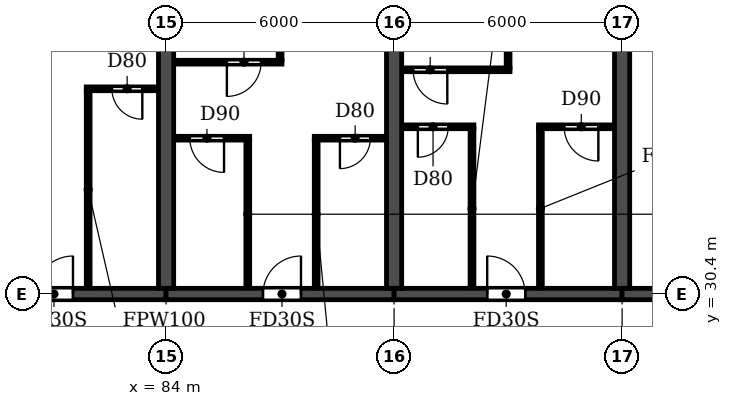
"""IFC4 building model, lengths in metres.
Left out: names, types, materials, properties, quantities, classifications, styles, units other than length and angle.
Written with IfcOpenShell. Run it as: python <this file> out.ifc"""

import sys

from ifc_helpers import new_model, si_unit, direction, frame, frame_2d, origin, place, context, subcontext, project, spatial, rectangle, extrude, element, fill, save


model = new_model("IFC4")
c1 = context("Model", 3, precision=1e-05, world=origin(), true_north=direction((0.0, 1.0)))
c2 = subcontext(c1, "Body", "Model", "MODEL_VIEW")
j1 = project(units=[si_unit("LENGTHUNIT", "METRE"), si_unit("PLANEANGLEUNIT", "RADIAN")], contexts=[c1])
p1 = place(None, origin())
s1 = spatial("IfcSite", under=j1, at=p1, CompositionType="ELEMENT")
p2 = place(p1, origin())
s2 = spatial("IfcBuilding", under=s1, at=p2, CompositionType="ELEMENT")
p3 = place(p2, frame((0.0, 0.0, 33.3)))
s3 = spatial("IfcBuildingStorey", under=s2, at=p3, CompositionType="ELEMENT", Elevation=33.3)
for number, where, z_axis, x_axis in (
    (1, (84.0, 30.55, 0.0), (0.0, 0.0, 1.0), (0.0, 1.0, 0.0)),
    (2, (90.0, 30.55, 0.0), (0.0, 0.0, 1.0), (0.0, 1.0, 0.0)),
    (3, (96.0, 30.55, 0.0), (0.0, 0.0, 1.0), (0.0, 1.0, 0.0)),
):
    element("IfcWall", number, at=place(p3, frame(where, z_axis=z_axis, x_axis=x_axis)), inside=s3, PredefinedType="SHEAR", context=c2, shape_type="SweptSolid", body=[
        extrude(rectangle(XDim=14.05, YDim=0.4, at=frame_2d((7.025, 0.0))), origin(), (0.0, 0.0, 1.0), 3.05),
    ])
p4 = place(p3, frame((78.0, 30.4, 0.0), z_axis=(0.0, 0.0, 1.0), x_axis=(1.0, 0.0, 0.0)))
e4 = element("IfcWall", 4, at=p4, inside=s3, PredefinedType="SHEAR", context=c2, shape_type="SweptSolid", body=[
    extrude(rectangle(XDim=6.0, YDim=0.3, at=frame_2d((3.0, 0.0))), origin(), (0.0, 0.0, 1.0), 2.45),
])
p5 = place(p4, frame((2.55, 0.0, 0.0)))
e5 = element("IfcOpeningElement", 5, at=p5, cuts=e4, PredefinedType="OPENING", context=c2, shape_type="SweptSolid", body=[
    extrude(rectangle(XDim=1.0, YDim=2.1, at=frame_2d((0.5, 1.05))), frame((0.0, 0.16, 0.0), z_axis=(0.0, -1.0, 0.0), x_axis=(1.0, 0.0, 0.0)), (0.0, 0.0, 1.0), 0.32),
])
p6 = place(p3, frame((84.0, 30.4, 0.0), z_axis=(0.0, 0.0, 1.0), x_axis=(1.0, 0.0, 0.0)))
e6 = element("IfcWall", 6, at=p6, inside=s3, PredefinedType="SHEAR", context=c2, shape_type="SweptSolid", body=[
    extrude(rectangle(XDim=6.0, YDim=0.3, at=frame_2d((3.0, 0.0))), origin(), (0.0, 0.0, 1.0), 2.45),
])
p7 = place(p6, frame((2.55, 0.0, 0.0)))
e7 = element("IfcOpeningElement", 7, at=p7, cuts=e6, PredefinedType="OPENING", context=c2, shape_type="SweptSolid", body=[
    extrude(rectangle(XDim=1.0, YDim=2.1, at=frame_2d((0.5, 1.05))), frame((0.0, 0.16, 0.0), z_axis=(0.0, -1.0, 0.0), x_axis=(1.0, 0.0, 0.0)), (0.0, 0.0, 1.0), 0.32),
])
p8 = place(p3, frame((90.0, 30.4, 0.0), z_axis=(0.0, 0.0, 1.0), x_axis=(1.0, 0.0, 0.0)))
e8 = element("IfcWall", 8, at=p8, inside=s3, PredefinedType="SHEAR", context=c2, shape_type="SweptSolid", body=[
    extrude(rectangle(XDim=6.0, YDim=0.3, at=frame_2d((3.0, 0.0))), origin(), (0.0, 0.0, 1.0), 2.45),
])
p9 = place(p8, frame((2.45, 0.0, 0.0)))
e9 = element("IfcOpeningElement", 9, at=p9, cuts=e8, PredefinedType="OPENING", context=c2, shape_type="SweptSolid", body=[
    extrude(rectangle(XDim=1.0, YDim=2.1, at=frame_2d((0.5, 1.05))), frame((0.0, 0.16, 0.0), z_axis=(0.0, -1.0, 0.0), x_axis=(1.0, 0.0, 0.0)), (0.0, 0.0, 1.0), 0.32),
])
p10 = place(p3, frame((96.0, 30.4, 0.0), z_axis=(0.0, 0.0, 1.0), x_axis=(1.0, 0.0, 0.0)))
e10 = element("IfcWall", 10, at=p10, inside=s3, PredefinedType="SHEAR", context=c2, shape_type="SweptSolid", body=[
    extrude(rectangle(XDim=5.8, YDim=0.3, at=frame_2d((2.9, 0.0))), origin(), (0.0, 0.0, 1.0), 2.45),
])
p11 = place(p10, frame((2.5, 0.0, 0.0)))
e11 = element("IfcOpeningElement", 11, at=p11, cuts=e10, PredefinedType="OPENING", context=c2, shape_type="SweptSolid", body=[
    extrude(rectangle(XDim=1.0, YDim=2.1, at=frame_2d((0.5, 1.05))), frame((0.0, 0.16, 0.0), z_axis=(0.0, -1.0, 0.0), x_axis=(1.0, 0.0, 0.0)), (0.0, 0.0, 1.0), 0.32),
])
p12 = place(p3, frame((84.21, 34.5, 0.0), z_axis=(0.0, 0.0, 1.0), x_axis=(1.0, 0.0, 0.0)))
e12 = element("IfcWall", 12, at=p12, inside=s3, PredefinedType="PARTITIONING", context=c2, shape_type="SweptSolid", body=[
    extrude(rectangle(XDim=1.99, YDim=0.1, at=frame_2d((0.995, 0.0))), origin(), (0.0, 0.0, 1.0), 3.05),
])
p13 = place(p12, frame((0.415, 0.0, 0.0)))
e13 = element("IfcOpeningElement", 13, at=p13, cuts=e12, PredefinedType="OPENING", context=c2, shape_type="SweptSolid", body=[
    extrude(rectangle(XDim=0.9, YDim=2.1, at=frame_2d((0.45, 1.05))), frame((0.0, 0.06, 0.0), z_axis=(0.0, -1.0, 0.0), x_axis=(1.0, 0.0, 0.0)), (0.0, 0.0, 1.0), 0.12),
])
p14 = place(p3, frame((87.9, 34.5, 0.0), z_axis=(0.0, 0.0, 1.0), x_axis=(1.0, 0.0, 0.0)))
e14 = element("IfcWall", 14, at=p14, inside=s3, PredefinedType="PARTITIONING", context=c2, shape_type="SweptSolid", body=[
    extrude(rectangle(XDim=1.89, YDim=0.1, at=frame_2d((0.945, 0.0))), origin(), (0.0, 0.0, 1.0), 3.05),
])
p15 = place(p14, frame((0.675, 0.0, 0.0)))
e15 = element("IfcOpeningElement", 15, at=p15, cuts=e14, PredefinedType="OPENING", context=c2, shape_type="SweptSolid", body=[
    extrude(rectangle(XDim=0.8, YDim=2.1, at=frame_2d((0.4, 1.05))), frame((0.0, 0.06, 0.0), z_axis=(0.0, -1.0, 0.0), x_axis=(1.0, 0.0, 0.0)), (0.0, 0.0, 1.0), 0.12),
])
p16 = place(p3, frame((90.21, 34.8, 0.0), z_axis=(0.0, 0.0, 1.0), x_axis=(1.0, 0.0, 0.0)))
e16 = element("IfcWall", 16, at=p16, inside=s3, PredefinedType="PARTITIONING", context=c2, shape_type="SweptSolid", body=[
    extrude(rectangle(XDim=1.89, YDim=0.1, at=frame_2d((0.945, 0.0))), origin(), (0.0, 0.0, 1.0), 3.05),
])
p17 = place(p16, frame((0.415, 0.0, 0.0)))
e17 = element("IfcOpeningElement", 17, at=p17, cuts=e16, PredefinedType="OPENING", context=c2, shape_type="SweptSolid", body=[
    extrude(rectangle(XDim=0.8, YDim=2.1, at=frame_2d((0.4, 1.05))), frame((0.0, 0.06, 0.0), z_axis=(0.0, -1.0, 0.0), x_axis=(1.0, 0.0, 0.0)), (0.0, 0.0, 1.0), 0.12),
])
p18 = place(p3, frame((93.8, 34.8, 0.0), z_axis=(0.0, 0.0, 1.0), x_axis=(1.0, 0.0, 0.0)))
e18 = element("IfcWall", 18, at=p18, inside=s3, PredefinedType="PARTITIONING", context=c2, shape_type="SweptSolid", body=[
    extrude(rectangle(XDim=1.99, YDim=0.1, at=frame_2d((0.995, 0.0))), origin(), (0.0, 0.0, 1.0), 3.05),
])
p19 = place(p18, frame((0.675, 0.0, 0.0)))
e19 = element("IfcOpeningElement", 19, at=p19, cuts=e18, PredefinedType="OPENING", context=c2, shape_type="SweptSolid", body=[
    extrude(rectangle(XDim=0.9, YDim=2.1, at=frame_2d((0.45, 1.05))), frame((0.0, 0.06, 0.0), z_axis=(0.0, -1.0, 0.0), x_axis=(1.0, 0.0, 0.0)), (0.0, 0.0, 1.0), 0.12),
])
p20 = place(p3, frame((81.9, 35.8, 0.0), z_axis=(0.0, 0.0, 1.0), x_axis=(1.0, 0.0, 0.0)))
e20 = element("IfcWall", 20, at=p20, inside=s3, PredefinedType="PARTITIONING", context=c2, shape_type="SweptSolid", body=[
    extrude(rectangle(XDim=1.89, YDim=0.1, at=frame_2d((0.945, 0.0))), origin(), (0.0, 0.0, 1.0), 3.05),
])
p21 = place(p20, frame((0.675, 0.0, 0.0)))
e21 = element("IfcOpeningElement", 21, at=p21, cuts=e20, PredefinedType="OPENING", context=c2, shape_type="SweptSolid", body=[
    extrude(rectangle(XDim=0.8, YDim=2.1, at=frame_2d((0.4, 1.05))), frame((0.0, 0.06, 0.0), z_axis=(0.0, -1.0, 0.0), x_axis=(1.0, 0.0, 0.0)), (0.0, 0.0, 1.0), 0.12),
])
p22 = place(p3, frame((90.21, 36.3, 0.0), z_axis=(0.0, 0.0, 1.0), x_axis=(1.0, 0.0, 0.0)))
e22 = element("IfcWall", 22, at=p22, inside=s3, PredefinedType="PARTITIONING", context=c2, shape_type="SweptSolid", body=[
    extrude(rectangle(XDim=2.84, YDim=0.1, at=frame_2d((1.42, 0.0))), origin(), (0.0, 0.0, 1.0), 3.05),
])
p23 = place(p22, frame((0.29, 0.0, 0.0)))
e23 = element("IfcOpeningElement", 23, at=p23, cuts=e22, PredefinedType="OPENING", context=c2, shape_type="SweptSolid", body=[
    extrude(rectangle(XDim=0.9, YDim=2.1, at=frame_2d((0.45, 1.05))), frame((0.0, 0.06, 0.0), z_axis=(0.0, -1.0, 0.0), x_axis=(1.0, 0.0, 0.0)), (0.0, 0.0, 1.0), 0.12),
])
p24 = place(p3, frame((84.21, 36.5, 0.0), z_axis=(0.0, 0.0, 1.0), x_axis=(1.0, 0.0, 0.0)))
e24 = element("IfcWall", 24, at=p24, inside=s3, PredefinedType="PARTITIONING", context=c2, shape_type="SweptSolid", body=[
    extrude(rectangle(XDim=2.84, YDim=0.1, at=frame_2d((1.42, 0.0))), origin(), (0.0, 0.0, 1.0), 3.05),
])
p25 = place(p24, frame((1.39, 0.0, 0.0)))
e25 = element("IfcOpeningElement", 25, at=p25, cuts=e24, PredefinedType="OPENING", context=c2, shape_type="SweptSolid", body=[
    extrude(rectangle(XDim=0.9, YDim=2.1, at=frame_2d((0.45, 1.05))), frame((0.0, 0.06, 0.0), z_axis=(0.0, -1.0, 0.0), x_axis=(1.0, 0.0, 0.0)), (0.0, 0.0, 1.0), 0.12),
])
p26 = place(p3, frame((81.95, 30.56, 0.0), z_axis=(0.0, 0.0, 1.0), x_axis=(0.0, 1.0, 0.0)))
e26 = element("IfcWall", 26, at=p26, inside=s3, PredefinedType="PARTITIONING", context=c2, shape_type="SweptSolid", body=[
    extrude(rectangle(XDim=5.19, YDim=0.1, at=frame_2d((2.595, 0.0))), origin(), (0.0, 0.0, 1.0), 3.05),
])
p27 = place(p3, frame((86.15, 30.56, 0.0), z_axis=(0.0, 0.0, 1.0), x_axis=(0.0, 1.0, 0.0)))
e27 = element("IfcWall", 27, at=p27, inside=s3, PredefinedType="PARTITIONING", context=c2, shape_type="SweptSolid", body=[
    extrude(rectangle(XDim=3.89, YDim=0.1, at=frame_2d((1.945, 0.0))), origin(), (0.0, 0.0, 1.0), 3.05),
])
p28 = place(p3, frame((87.0, 36.55, 0.0), z_axis=(0.0, 0.0, 1.0), x_axis=(0.0, 1.0, 0.0)))
e28 = element("IfcWall", 28, at=p28, inside=s3, PredefinedType="PARTITIONING", context=c2, shape_type="SweptSolid", body=[
    extrude(rectangle(XDim=8.19, YDim=0.1, at=frame_2d((4.095, 0.0))), origin(), (0.0, 0.0, 1.0), 3.05),
])
p29 = place(p3, frame((87.95, 30.56, 0.0), z_axis=(0.0, 0.0, 1.0), x_axis=(0.0, 1.0, 0.0)))
e29 = element("IfcWall", 29, at=p29, inside=s3, PredefinedType="PARTITIONING", context=c2, shape_type="SweptSolid", body=[
    extrude(rectangle(XDim=3.89, YDim=0.1, at=frame_2d((1.945, 0.0))), origin(), (0.0, 0.0, 1.0), 3.05),
])
p30 = place(p3, frame((92.05, 30.56, 0.0), z_axis=(0.0, 0.0, 1.0), x_axis=(0.0, 1.0, 0.0)))
e30 = element("IfcWall", 30, at=p30, inside=s3, PredefinedType="PARTITIONING", context=c2, shape_type="SweptSolid", body=[
    extrude(rectangle(XDim=4.19, YDim=0.1, at=frame_2d((2.095, 0.0))), origin(), (0.0, 0.0, 1.0), 3.05),
])
p31 = place(p3, frame((93.0, 36.35, 0.0), z_axis=(0.0, 0.0, 1.0), x_axis=(0.0, 1.0, 0.0)))
e31 = element("IfcWall", 31, at=p31, inside=s3, PredefinedType="PARTITIONING", context=c2, shape_type="SweptSolid", body=[
    extrude(rectangle(XDim=8.39, YDim=0.1, at=frame_2d((4.195, 0.0))), origin(), (0.0, 0.0, 1.0), 3.05),
])
p32 = place(p3, frame((93.85, 30.56, 0.0), z_axis=(0.0, 0.0, 1.0), x_axis=(0.0, 1.0, 0.0)))
e32 = element("IfcWall", 32, at=p32, inside=s3, PredefinedType="PARTITIONING", context=c2, shape_type="SweptSolid", body=[
    extrude(rectangle(XDim=4.19, YDim=0.1, at=frame_2d((2.095, 0.0))), origin(), (0.0, 0.0, 1.0), 3.05),
])
p33 = place(p5, origin())
e33 = element("IfcDoor", 33, at=p33, inside=s3, OperationType="SINGLE_SWING_RIGHT", PredefinedType="DOOR", context=c2, shape_type="SweptSolid", body=[
    extrude(rectangle(XDim=1.0, YDim=2.1, at=frame_2d((0.5, 1.05))), frame((0.0, 0.025, 0.0), z_axis=(0.0, -1.0, 0.0), x_axis=(1.0, 0.0, 0.0)), (0.0, 0.0, 1.0), 0.05),
])
fill(e5, e33)
p34 = place(p21, frame((0.8, 0.0, 0.0), z_axis=(0.0, 0.0, 1.0), x_axis=(-1.0, 0.0, 0.0)))
e34 = element("IfcDoor", 34, at=p34, inside=s3, OperationType="SINGLE_SWING_LEFT", PredefinedType="DOOR", context=c2, shape_type="SweptSolid", body=[
    extrude(rectangle(XDim=0.8, YDim=2.1, at=frame_2d((0.4, 1.05))), frame((0.0, 0.025, 0.0), z_axis=(0.0, -1.0, 0.0), x_axis=(1.0, 0.0, 0.0)), (0.0, 0.0, 1.0), 0.05),
])
fill(e21, e34)
p35 = place(p13, frame((0.9, 0.0, 0.0), z_axis=(0.0, 0.0, 1.0), x_axis=(-1.0, 0.0, 0.0)))
e35 = element("IfcDoor", 35, at=p35, inside=s3, OperationType="SINGLE_SWING_LEFT", PredefinedType="DOOR", context=c2, shape_type="SweptSolid", body=[
    extrude(rectangle(XDim=0.9, YDim=2.1, at=frame_2d((0.45, 1.05))), frame((0.0, 0.025, 0.0), z_axis=(0.0, -1.0, 0.0), x_axis=(1.0, 0.0, 0.0)), (0.0, 0.0, 1.0), 0.05),
])
fill(e13, e35)
p36 = place(p25, frame((0.9, 0.0, 0.0), z_axis=(0.0, 0.0, 1.0), x_axis=(-1.0, 0.0, 0.0)))
e36 = element("IfcDoor", 36, at=p36, inside=s3, OperationType="SINGLE_SWING_RIGHT", PredefinedType="DOOR", context=c2, shape_type="SweptSolid", body=[
    extrude(rectangle(XDim=0.9, YDim=2.1, at=frame_2d((0.45, 1.05))), frame((0.0, 0.025, 0.0), z_axis=(0.0, -1.0, 0.0), x_axis=(1.0, 0.0, 0.0)), (0.0, 0.0, 1.0), 0.05),
])
fill(e25, e36)
p37 = place(p7, origin())
e37 = element("IfcDoor", 37, at=p37, inside=s3, OperationType="SINGLE_SWING_RIGHT", PredefinedType="DOOR", context=c2, shape_type="SweptSolid", body=[
    extrude(rectangle(XDim=1.0, YDim=2.1, at=frame_2d((0.5, 1.05))), frame((0.0, 0.025, 0.0), z_axis=(0.0, -1.0, 0.0), x_axis=(1.0, 0.0, 0.0)), (0.0, 0.0, 1.0), 0.05),
])
fill(e7, e37)
p38 = place(p15, frame((0.8, 0.0, 0.0), z_axis=(0.0, 0.0, 1.0), x_axis=(-1.0, 0.0, 0.0)))
e38 = element("IfcDoor", 38, at=p38, inside=s3, OperationType="SINGLE_SWING_RIGHT", PredefinedType="DOOR", context=c2, shape_type="SweptSolid", body=[
    extrude(rectangle(XDim=0.8, YDim=2.1, at=frame_2d((0.4, 1.05))), frame((0.0, 0.025, 0.0), z_axis=(0.0, -1.0, 0.0), x_axis=(1.0, 0.0, 0.0)), (0.0, 0.0, 1.0), 0.05),
])
fill(e15, e38)
p39 = place(p23, frame((0.9, 0.0, 0.0), z_axis=(0.0, 0.0, 1.0), x_axis=(-1.0, 0.0, 0.0)))
e39 = element("IfcDoor", 39, at=p39, inside=s3, OperationType="SINGLE_SWING_LEFT", PredefinedType="DOOR", context=c2, shape_type="SweptSolid", body=[
    extrude(rectangle(XDim=0.9, YDim=2.1, at=frame_2d((0.45, 1.05))), frame((0.0, 0.025, 0.0), z_axis=(0.0, -1.0, 0.0), x_axis=(1.0, 0.0, 0.0)), (0.0, 0.0, 1.0), 0.05),
])
fill(e23, e39)
p40 = place(p17, frame((0.8, 0.0, 0.0), z_axis=(0.0, 0.0, 1.0), x_axis=(-1.0, 0.0, 0.0)))
e40 = element("IfcDoor", 40, at=p40, inside=s3, OperationType="SINGLE_SWING_RIGHT", PredefinedType="DOOR", context=c2, shape_type="SweptSolid", body=[
    extrude(rectangle(XDim=0.8, YDim=2.1, at=frame_2d((0.4, 1.05))), frame((0.0, 0.025, 0.0), z_axis=(0.0, -1.0, 0.0), x_axis=(1.0, 0.0, 0.0)), (0.0, 0.0, 1.0), 0.05),
])
fill(e17, e40)
p41 = place(p9, origin())
e41 = element("IfcDoor", 41, at=p41, inside=s3, OperationType="SINGLE_SWING_LEFT", PredefinedType="DOOR", context=c2, shape_type="SweptSolid", body=[
    extrude(rectangle(XDim=1.0, YDim=2.1, at=frame_2d((0.5, 1.05))), frame((0.0, 0.025, 0.0), z_axis=(0.0, -1.0, 0.0), x_axis=(1.0, 0.0, 0.0)), (0.0, 0.0, 1.0), 0.05),
])
fill(e9, e41)
p42 = place(p19, frame((0.9, 0.0, 0.0), z_axis=(0.0, 0.0, 1.0), x_axis=(-1.0, 0.0, 0.0)))
e42 = element("IfcDoor", 42, at=p42, inside=s3, OperationType="SINGLE_SWING_LEFT", PredefinedType="DOOR", context=c2, shape_type="SweptSolid", body=[
    extrude(rectangle(XDim=0.9, YDim=2.1, at=frame_2d((0.45, 1.05))), frame((0.0, 0.025, 0.0), z_axis=(0.0, -1.0, 0.0), x_axis=(1.0, 0.0, 0.0)), (0.0, 0.0, 1.0), 0.05),
])
fill(e19, e42)
save(model, sys.argv[1])
